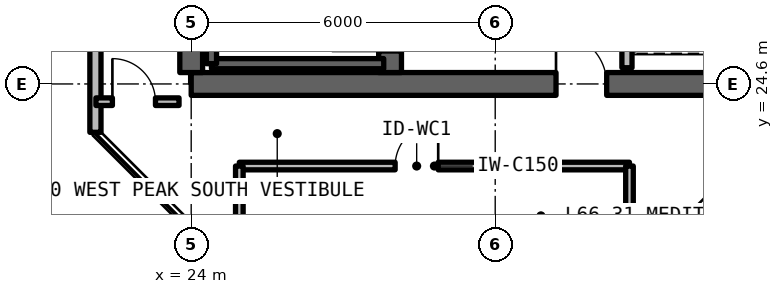
"""IFC4 building model, lengths in metres.
Left out: names, types, materials, properties, quantities, classifications, styles, units other than length and angle.
Written with IfcOpenShell. Run it as: python <this file> out.ifc"""

import sys

from ifc_helpers import new_model, si_unit, direction, frame, frame_2d, origin, place, context, subcontext, project, spatial, rectangle, extrude, element, fill, save


model = new_model("IFC4")
c1 = context("Model", 3, precision=1e-05, world=origin(), true_north=direction((0.0, 1.0)))
c2 = subcontext(c1, "Body", "Model", "MODEL_VIEW")
j1 = project(units=[si_unit("LENGTHUNIT", "METRE"), si_unit("PLANEANGLEUNIT", "RADIAN")], contexts=[c1])
p1 = place(None, origin())
s1 = spatial("IfcSite", under=j1, at=p1, CompositionType="ELEMENT")
p2 = place(p1, origin())
s2 = spatial("IfcBuilding", under=s1, at=p2, CompositionType="ELEMENT")
p3 = place(p2, frame((0.0, 0.0, 235.95)))
s3 = spatial("IfcBuildingStorey", under=s2, at=p3, CompositionType="ELEMENT", Elevation=235.95)
p4 = place(p3, frame((24.0, 24.6, 0.0), z_axis=(0.0, 0.0, 1.0), x_axis=(1.0, 0.0, 0.0)))
e1 = element("IfcWall", 1, at=p4, inside=s3, PredefinedType="SHEAR", context=c2, shape_type="SweptSolid", body=[
    extrude(rectangle(XDim=12.0, YDim=0.45, at=frame_2d((6.0, 0.0))), origin(), (0.0, 0.0, 1.0), 3.3),
])
p5 = place(p4, frame((7.2, 0.0, 0.0)))
e2 = element("IfcOpeningElement", 2, at=p5, cuts=e1, PredefinedType="OPENING", context=c2, shape_type="SweptSolid", body=[
    extrude(rectangle(XDim=1.0, YDim=2.15, at=frame_2d((0.5, 1.075))), frame((0.0, 0.235, 0.0), z_axis=(0.0, -1.0, 0.0), x_axis=(1.0, 0.0, 0.0)), (0.0, 0.0, 1.0), 0.47),
])
p6 = place(p3, frame((24.0, 24.825, 0.0), z_axis=(0.0, 0.0, 1.0), x_axis=(0.0, 1.0, 0.0)))
e3 = element("IfcWall", 3, at=p6, inside=s3, PredefinedType="SHEAR", context=c2, shape_type="SweptSolid", body=[
    extrude(rectangle(XDim=17.55, YDim=0.45, at=frame_2d((8.775, 0.0))), origin(), (0.0, 0.0, 1.0), 3.3),
])
p7 = place(p3, frame((27.925, 24.825, 0.0), z_axis=(0.0, 0.0, 1.0), x_axis=(0.0, 1.0, 0.0)))
e4 = element("IfcWall", 4, at=p7, inside=s3, PredefinedType="SHEAR", context=c2, shape_type="SweptSolid", body=[
    extrude(rectangle(XDim=17.55, YDim=0.45, at=frame_2d((8.775, 0.0))), origin(), (0.0, 0.0, 1.0), 3.3),
])
p8 = place(p7, frame((0.425, 0.0, 0.0)))
e5 = element("IfcOpeningElement", 5, at=p8, cuts=e4, PredefinedType="OPENING", context=c2, shape_type="SweptSolid", body=[
    extrude(rectangle(XDim=1.15, YDim=2.15, at=frame_2d((0.575, 1.075))), frame((0.0, 0.235, 0.0), z_axis=(0.0, -1.0, 0.0), x_axis=(1.0, 0.0, 0.0)), (0.0, 0.0, 1.0), 0.47),
])
p9 = place(p7, frame((9.625, 0.0, 0.0)))
e6 = element("IfcOpeningElement", 6, at=p9, cuts=e4, PredefinedType="OPENING", context=c2, shape_type="SweptSolid", body=[
    extrude(rectangle(XDim=1.15, YDim=2.15, at=frame_2d((0.575, 1.075))), frame((0.0, 0.235, 0.0), z_axis=(0.0, -1.0, 0.0), x_axis=(1.0, 0.0, 0.0)), (0.0, 0.0, 1.0), 0.47),
])
p10 = place(p3, frame((22.11, 43.554, 0.0), z_axis=(0.0, 0.0, 1.0), x_axis=(0.0, -1.0, 0.0)))
e7 = element("IfcWall", 7, at=p10, inside=s3, PredefinedType="SOLIDWALL", context=c2, shape_type="SweptSolid", body=[
    extrude(rectangle(XDim=19.909, YDim=0.22, at=frame_2d((9.955, 0.0))), origin(), (0.0, 0.0, 1.0), 3.08),
])
p11 = place(p10, frame((7.754, 0.0, 0.78)))
e8 = element("IfcOpeningElement", 8, at=p11, cuts=e7, PredefinedType="OPENING", context=c2, shape_type="SweptSolid", body=[
    extrude(rectangle(XDim=4.4, YDim=1.66, at=frame_2d((2.2, 0.83))), frame((0.0, 0.12, 0.0), z_axis=(0.0, -1.0, 0.0), x_axis=(1.0, 0.0, 0.0)), (0.0, 0.0, 1.0), 0.24),
])
p12 = place(p3, frame((32.6, 24.92, 0.0), z_axis=(0.0, 0.0, 1.0), x_axis=(0.0, 1.0, 0.0)))
e9 = element("IfcWall", 9, at=p12, inside=s3, PredefinedType="SOLIDWALL", context=c2, shape_type="SweptSolid", body=[
    extrude(rectangle(XDim=3.58, YDim=0.2, at=frame_2d((1.79, 0.0))), origin(), (0.0, 0.0, 1.0), 2.35),
])
p13 = place(p12, frame((1.3, 0.0, 0.0)))
e10 = element("IfcOpeningElement", 10, at=p13, cuts=e9, PredefinedType="OPENING", context=c2, shape_type="SweptSolid", body=[
    extrude(rectangle(XDim=1.1, YDim=2.2, at=frame_2d((0.55, 1.1))), frame((0.0, 0.11, 0.0), z_axis=(0.0, -1.0, 0.0), x_axis=(1.0, 0.0, 0.0)), (0.0, 0.0, 1.0), 0.22),
])
p14 = place(p3, frame((24.95, 22.98, 0.0), z_axis=(0.0, 0.0, 1.0), x_axis=(1.0, 0.0, 0.0)))
e11 = element("IfcWall", 11, at=p14, inside=s3, PredefinedType="SOLIDWALL", context=c2, shape_type="SweptSolid", body=[
    extrude(rectangle(XDim=7.7, YDim=0.15, at=frame_2d((3.85, 0.0))), origin(), (0.0, 0.0, 1.0), 2.35),
])
p15 = place(p14, frame((3.075, 0.0, 0.0)))
e12 = element("IfcOpeningElement", 12, at=p15, cuts=e11, PredefinedType="OPENING", context=c2, shape_type="SweptSolid", body=[
    extrude(rectangle(XDim=0.85, YDim=2.1, at=frame_2d((0.425, 1.05))), frame((0.0, 0.085, 0.0), z_axis=(0.0, -1.0, 0.0), x_axis=(1.0, 0.0, 0.0)), (0.0, 0.0, 1.0), 0.17),
])
for number, where, z_axis, x_axis in (
    (13, (24.95, 20.92, 0.0), (0.0, 0.0, 1.0), (0.0, 1.0, 0.0)),
    (14, (32.65, 20.92, 0.0), (0.0, 0.0, 1.0), (0.0, 1.0, 0.0)),
):
    element("IfcWall", number, at=place(p3, frame(where, z_axis=z_axis, x_axis=x_axis)), inside=s3, PredefinedType="SOLIDWALL", context=c2, shape_type="SweptSolid", body=[
        extrude(rectangle(XDim=2.06, YDim=0.15, at=frame_2d((1.03, 0.0))), origin(), (0.0, 0.0, 1.0), 2.35),
    ])
p16 = place(p3, frame((22.12, 24.25, 0.0), z_axis=(0.0, 0.0, 1.0), x_axis=(1.0, 0.0, 0.0)))
e15 = element("IfcWall", 15, at=p16, inside=s3, PredefinedType="SOLIDWALL", context=c2, shape_type="SweptSolid", body=[
    extrude(rectangle(XDim=1.64, YDim=0.15, at=frame_2d((0.82, 0.0))), origin(), (0.0, 0.0, 1.0), 2.35),
])
p17 = place(p16, frame((0.325, 0.0, 0.0)))
e16 = element("IfcOpeningElement", 16, at=p17, cuts=e15, PredefinedType="OPENING", context=c2, shape_type="SweptSolid", body=[
    extrude(rectangle(XDim=0.85, YDim=2.1, at=frame_2d((0.425, 1.05))), frame((0.0, 0.085, 0.0), z_axis=(0.0, -1.0, 0.0), x_axis=(1.0, 0.0, 0.0)), (0.0, 0.0, 1.0), 0.17),
])
p18 = place(p3, frame((24.4, 25.0, 0.0), z_axis=(0.0, 0.0, 1.0), x_axis=(1.0, 0.0, 0.0)))
e17 = element("IfcWall", 17, at=p18, inside=s3, PredefinedType="SOLIDWALL", context=c2, shape_type="SweptSolid", body=[
    extrude(rectangle(XDim=3.4, YDim=0.2, at=frame_2d((1.7, 0.0))), origin(), (0.0, 0.0, 1.0), 3.3),
])
p19 = place(p3, frame((24.4, 33.0, 0.0), z_axis=(0.0, 0.0, 1.0), x_axis=(0.0, -1.0, 0.0)))
e18 = element("IfcWall", 18, at=p19, inside=s3, PredefinedType="SOLIDWALL", context=c2, shape_type="SweptSolid", body=[
    extrude(rectangle(XDim=8.0, YDim=0.2, at=frame_2d((4.0, 0.0))), origin(), (0.0, 0.0, 1.0), 3.3),
])
p20 = place(p15, origin())
e19 = element("IfcDoor", 19, at=p20, inside=s3, OperationType="SINGLE_SWING_RIGHT", PredefinedType="DOOR", context=c2, shape_type="SweptSolid", body=[
    extrude(rectangle(XDim=0.85, YDim=2.1, at=frame_2d((0.425, 1.05))), frame((0.0, 0.025, 0.0), z_axis=(0.0, -1.0, 0.0), x_axis=(1.0, 0.0, 0.0)), (0.0, 0.0, 1.0), 0.05),
])
fill(e12, e19)
p21 = place(p17, origin())
e20 = element("IfcDoor", 20, at=p21, inside=s3, OperationType="SINGLE_SWING_LEFT", PredefinedType="DOOR", context=c2, shape_type="SweptSolid", body=[
    extrude(rectangle(XDim=0.85, YDim=2.1, at=frame_2d((0.425, 1.05))), frame((0.0, 0.025, 0.0), z_axis=(0.0, -1.0, 0.0), x_axis=(1.0, 0.0, 0.0)), (0.0, 0.0, 1.0), 0.05),
])
fill(e16, e20)
p22 = place(p5, origin())
e21 = element("IfcDoor", 21, at=p22, inside=s3, OperationType="SINGLE_SWING_LEFT", PredefinedType="DOOR", context=c2, shape_type="SweptSolid", body=[
    extrude(rectangle(XDim=1.0, YDim=2.15, at=frame_2d((0.5, 1.075))), frame((0.0, 0.025, 0.0), z_axis=(0.0, -1.0, 0.0), x_axis=(1.0, 0.0, 0.0)), (0.0, 0.0, 1.0), 0.05),
])
fill(e2, e21)
save(model, sys.argv[1])
